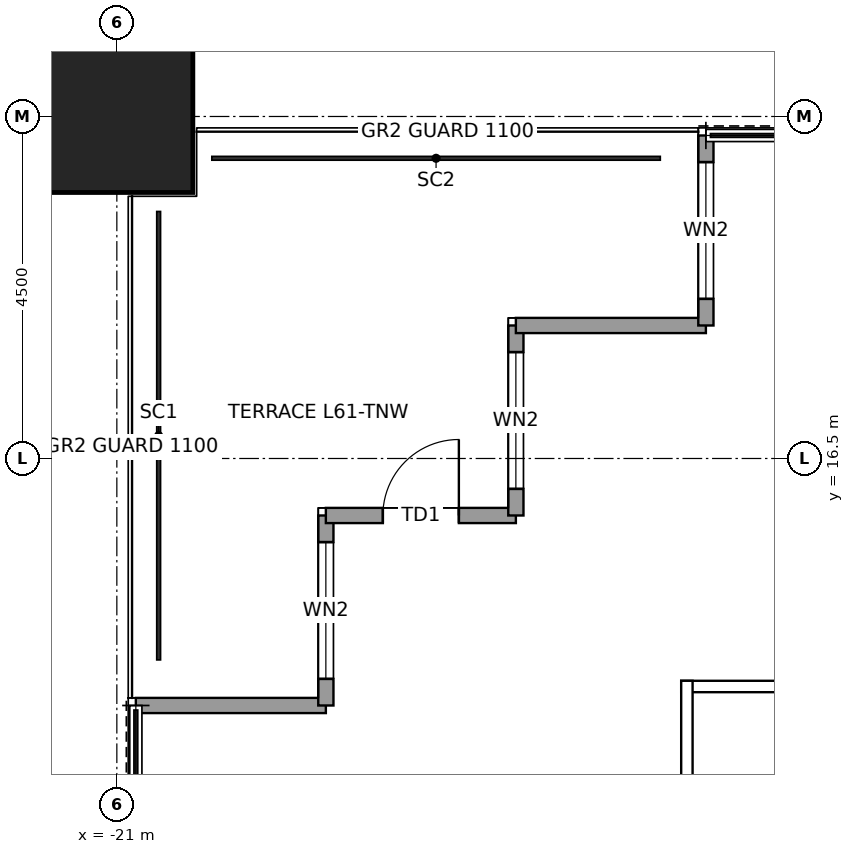
"""IFC4 building model, lengths in metres.
Left out: names, types, materials, properties, quantities, classifications, styles, units other than length and angle.
Written with IfcOpenShell. Run it as: python <this file> out.ifc"""

import sys

from ifc_helpers import new_model, si_unit, direction, frame, frame_2d, origin, origin_2d, place, context, subcontext, project, spatial, rectangle, hollow_rectangle, extrude, element, fill, save


model = new_model("IFC4")
c1 = context("Model", 3, precision=1e-05, world=origin(), true_north=direction((0.0, 1.0)))
c2 = subcontext(c1, "Body", "Model", "MODEL_VIEW")
j1 = project(units=[si_unit("LENGTHUNIT", "METRE"), si_unit("PLANEANGLEUNIT", "RADIAN")], contexts=[c1])
p1 = place(None, origin())
s1 = spatial("IfcSite", under=j1, at=p1, CompositionType="ELEMENT")
p2 = place(p1, origin())
s2 = spatial("IfcBuilding", under=s1, at=p2, CompositionType="ELEMENT")
p3 = place(p2, frame((0.0, 0.0, 279.9)))
s3 = spatial("IfcBuildingStorey", under=s2, at=p3, CompositionType="ELEMENT", Elevation=279.9)
p4 = place(p3, frame((-21.0, 21.0, 0.0), z_axis=(0.0, 0.0, 1.0), x_axis=(1.0, 0.0, 0.0)))
e1 = element("IfcColumn", 1, at=p4, inside=s3, PredefinedType="COLUMN", context=c2, shape_type="SweptSolid", body=[
    extrude(hollow_rectangle(XDim=2.0, YDim=2.0, WallThickness=0.095, at=origin_2d()), origin(), (0.0, 0.0, 1.0), 4.0),
])
p5 = place(p3, frame((-20.75, 13.25, 0.0), z_axis=(0.0, 0.0, 1.0), x_axis=(1.0, 0.0, 0.0)))
e2 = element("IfcWall", 2, at=p5, inside=s3, PredefinedType="SOLIDWALL", context=c2, shape_type="SweptSolid", body=[
    extrude(rectangle(XDim=2.5, YDim=0.2, at=frame_2d((1.25, 0.0))), origin(), (0.0, 0.0, 1.0), 3.85),
])
p6 = place(p3, frame((-18.25, 13.25, 0.0), z_axis=(0.0, 0.0, 1.0), x_axis=(0.0, 1.0, 0.0)))
e3 = element("IfcWall", 3, at=p6, inside=s3, PredefinedType="SOLIDWALL", context=c2, shape_type="SweptSolid", body=[
    extrude(rectangle(XDim=2.5, YDim=0.2, at=frame_2d((1.25, 0.0))), origin(), (0.0, 0.0, 1.0), 3.85),
])
p7 = place(p6, frame((0.35, 0.0, 0.3)))
e4 = element("IfcOpeningElement", 4, at=p7, cuts=e3, PredefinedType="OPENING", context=c2, shape_type="SweptSolid", body=[
    extrude(rectangle(XDim=1.8, YDim=2.4, at=frame_2d((0.9, 1.2))), frame((0.0, 0.11, 0.0), z_axis=(0.0, -1.0, 0.0), x_axis=(1.0, 0.0, 0.0)), (0.0, 0.0, 1.0), 0.22),
])
p8 = place(p3, frame((-18.25, 15.75, 0.0), z_axis=(0.0, 0.0, 1.0), x_axis=(1.0, 0.0, 0.0)))
e5 = element("IfcWall", 5, at=p8, inside=s3, PredefinedType="SOLIDWALL", context=c2, shape_type="SweptSolid", body=[
    extrude(rectangle(XDim=2.5, YDim=0.2, at=frame_2d((1.25, 0.0))), origin(), (0.0, 0.0, 1.0), 3.317),
])
p9 = place(p8, frame((0.75, 0.0, 0.0)))
e6 = element("IfcOpeningElement", 6, at=p9, cuts=e5, PredefinedType="OPENING", context=c2, shape_type="SweptSolid", body=[
    extrude(rectangle(XDim=1.0, YDim=2.4, at=frame_2d((0.5, 1.2))), frame((0.0, 0.11, 0.0), z_axis=(0.0, -1.0, 0.0), x_axis=(1.0, 0.0, 0.0)), (0.0, 0.0, 1.0), 0.22),
])
p10 = place(p3, frame((-15.75, 15.75, 0.0), z_axis=(0.0, 0.0, 1.0), x_axis=(0.0, 1.0, 0.0)))
e7 = element("IfcWall", 7, at=p10, inside=s3, PredefinedType="SOLIDWALL", context=c2, shape_type="SweptSolid", body=[
    extrude(rectangle(XDim=2.5, YDim=0.2, at=frame_2d((1.25, 0.0))), origin(), (0.0, 0.0, 1.0), 3.85),
])
p11 = place(p10, frame((0.35, 0.0, 0.3)))
e8 = element("IfcOpeningElement", 8, at=p11, cuts=e7, PredefinedType="OPENING", context=c2, shape_type="SweptSolid", body=[
    extrude(rectangle(XDim=1.8, YDim=2.4, at=frame_2d((0.9, 1.2))), frame((0.0, 0.11, 0.0), z_axis=(0.0, -1.0, 0.0), x_axis=(1.0, 0.0, 0.0)), (0.0, 0.0, 1.0), 0.22),
])
p12 = place(p3, frame((-15.75, 18.25, 0.0), z_axis=(0.0, 0.0, 1.0), x_axis=(1.0, 0.0, 0.0)))
e9 = element("IfcWall", 9, at=p12, inside=s3, PredefinedType="SOLIDWALL", context=c2, shape_type="SweptSolid", body=[
    extrude(rectangle(XDim=2.5, YDim=0.2, at=frame_2d((1.25, 0.0))), origin(), (0.0, 0.0, 1.0), 3.85),
])
p13 = place(p3, frame((-13.25, 18.25, 0.0), z_axis=(0.0, 0.0, 1.0), x_axis=(0.0, 1.0, 0.0)))
e10 = element("IfcWall", 10, at=p13, inside=s3, PredefinedType="SOLIDWALL", context=c2, shape_type="SweptSolid", body=[
    extrude(rectangle(XDim=2.5, YDim=0.2, at=frame_2d((1.25, 0.0))), origin(), (0.0, 0.0, 1.0), 3.85),
])
p14 = place(p13, frame((0.35, 0.0, 0.3)))
e11 = element("IfcOpeningElement", 11, at=p14, cuts=e10, PredefinedType="OPENING", context=c2, shape_type="SweptSolid", body=[
    extrude(rectangle(XDim=1.8, YDim=2.4, at=frame_2d((0.9, 1.2))), frame((0.0, 0.11, 0.0), z_axis=(0.0, -1.0, 0.0), x_axis=(1.0, 0.0, 0.0)), (0.0, 0.0, 1.0), 0.22),
])
p15 = place(p3, frame((-13.575, 13.5, 0.0), z_axis=(0.0, 0.0, 1.0), x_axis=(1.0, 0.0, 0.0)))
e12 = element("IfcWall", 12, at=p15, inside=s3, PredefinedType="PARTITIONING", context=c2, shape_type="SweptSolid", body=[
    extrude(rectangle(XDim=16.15, YDim=0.15, at=frame_2d((8.075, 0.0))), origin(), (0.0, 0.0, 1.0), 3.85),
])
p16 = place(p3, frame((-13.5, 2.425, 0.0), z_axis=(0.0, 0.0, 1.0), x_axis=(0.0, 1.0, 0.0)))
e13 = element("IfcWall", 13, at=p16, inside=s3, PredefinedType="PARTITIONING", context=c2, shape_type="SweptSolid", body=[
    extrude(rectangle(XDim=11.15, YDim=0.15, at=frame_2d((5.575, 0.0))), origin(), (0.0, 0.0, 1.0), 3.85),
])
p17 = place(p16, frame((5.075, 0.0, 0.0)))
e14 = element("IfcOpeningElement", 14, at=p17, cuts=e13, PredefinedType="OPENING", context=c2, shape_type="SweptSolid", body=[
    extrude(rectangle(XDim=1.0, YDim=2.4, at=frame_2d((0.5, 1.2))), frame((0.0, 0.085, 0.0), z_axis=(0.0, -1.0, 0.0), x_axis=(1.0, 0.0, 0.0)), (0.0, 0.0, 1.0), 0.17),
])
p18 = place(p7, origin())
e15 = element("IfcWindow", 15, at=p18, inside=s3, PartitioningType="SINGLE_PANEL", PredefinedType="WINDOW", context=c2, shape_type="SweptSolid", body=[
    extrude(rectangle(XDim=1.8, YDim=2.4, at=frame_2d((0.9, 1.2))), frame((0.0, 0.03, 0.0), z_axis=(0.0, -1.0, 0.0), x_axis=(1.0, 0.0, 0.0)), (0.0, 0.0, 1.0), 0.06),
])
fill(e4, e15)
p19 = place(p9, origin())
e16 = element("IfcDoor", 16, at=p19, inside=s3, OperationType="SINGLE_SWING_RIGHT", PredefinedType="DOOR", context=c2, shape_type="SweptSolid", body=[
    extrude(rectangle(XDim=1.0, YDim=2.4, at=frame_2d((0.5, 1.2))), frame((0.0, 0.025, 0.0), z_axis=(0.0, -1.0, 0.0), x_axis=(1.0, 0.0, 0.0)), (0.0, 0.0, 1.0), 0.05),
])
fill(e6, e16)
p20 = place(p11, origin())
e17 = element("IfcWindow", 17, at=p20, inside=s3, PartitioningType="SINGLE_PANEL", PredefinedType="WINDOW", context=c2, shape_type="SweptSolid", body=[
    extrude(rectangle(XDim=1.8, YDim=2.4, at=frame_2d((0.9, 1.2))), frame((0.0, 0.03, 0.0), z_axis=(0.0, -1.0, 0.0), x_axis=(1.0, 0.0, 0.0)), (0.0, 0.0, 1.0), 0.06),
])
fill(e8, e17)
p21 = place(p14, origin())
e18 = element("IfcWindow", 18, at=p21, inside=s3, PartitioningType="SINGLE_PANEL", PredefinedType="WINDOW", context=c2, shape_type="SweptSolid", body=[
    extrude(rectangle(XDim=1.8, YDim=2.4, at=frame_2d((0.9, 1.2))), frame((0.0, 0.03, 0.0), z_axis=(0.0, -1.0, 0.0), x_axis=(1.0, 0.0, 0.0)), (0.0, 0.0, 1.0), 0.06),
])
fill(e11, e18)
save(model, sys.argv[1])
